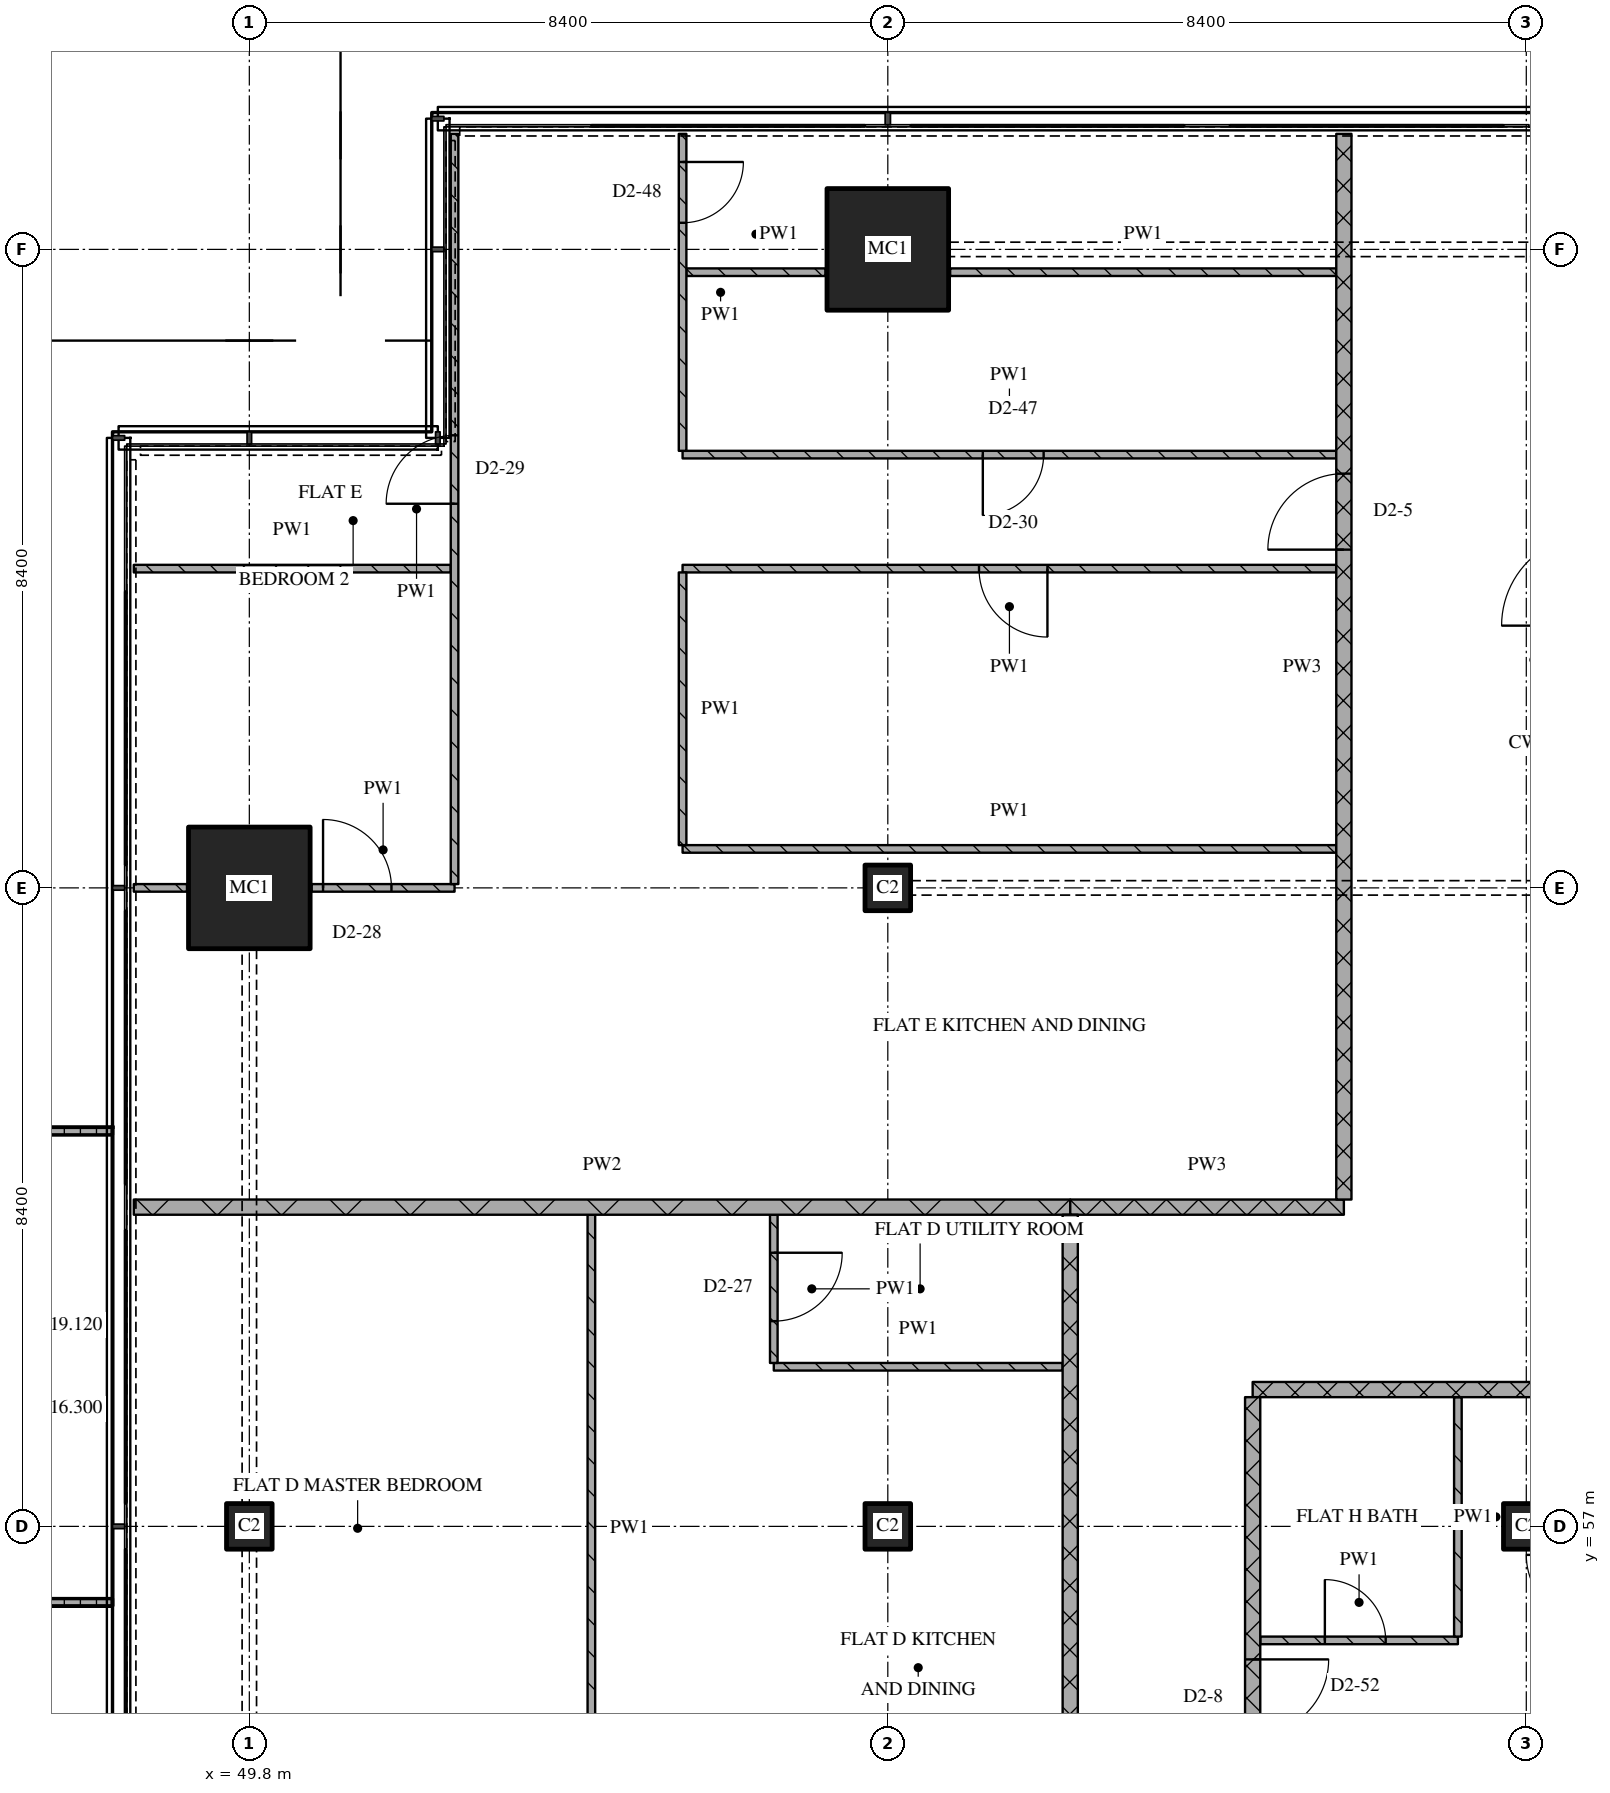
"""IFC4 building model, lengths in metres.
Left out: names, types, materials, properties, quantities, classifications, styles, units other than length and angle.
Written with IfcOpenShell. Run it as: python <this file> out.ifc"""

import sys

from ifc_helpers import new_model, si_unit, direction, frame, frame_2d, origin, origin_2d, place, context, subcontext, project, spatial, polyline, rectangle, outline, extrude, element, fill, save


model = new_model("IFC4")
c1 = context("Model", 3, precision=1e-05, world=origin(), true_north=direction((0.0, 1.0)))
c2 = subcontext(c1, "Body", "Model", "MODEL_VIEW")
j1 = project(units=[si_unit("LENGTHUNIT", "METRE"), si_unit("PLANEANGLEUNIT", "RADIAN")], contexts=[c1])
p1 = place(None, origin())
s1 = spatial("IfcSite", under=j1, at=p1, CompositionType="ELEMENT")
p2 = place(p1, origin())
s2 = spatial("IfcBuilding", under=s1, at=p2, CompositionType="ELEMENT")
p3 = place(p2, frame((0.0, 0.0, 216.3)))
s3 = spatial("IfcBuildingStorey", under=s2, at=p3, CompositionType="ELEMENT", Elevation=216.3)
p4 = place(p3, frame((49.8, 57.0, 0.0), z_axis=(0.0, 0.0, 1.0), x_axis=(1.0, 0.0, 0.0)))
e1 = element("IfcColumn", 1, at=p4, inside=s3, PredefinedType="COLUMN", context=c2, shape_type="SweptSolid", body=[
    extrude(rectangle(XDim=0.6, YDim=0.6, at=origin_2d()), origin(), (0.0, 0.0, 1.0), 3.6),
])
p5 = place(p3, frame((49.8, 65.4, 0.0), z_axis=(0.0, 0.0, 1.0), x_axis=(1.0, 0.0, 0.0)))
e2 = element("IfcColumn", 2, at=p5, inside=s3, PredefinedType="COLUMN", context=c2, shape_type="SweptSolid", body=[
    extrude(rectangle(XDim=1.6, YDim=1.6, at=origin_2d()), origin(), (0.0, 0.0, 1.0), 3.6),
])
for number, where, z_axis, x_axis in (
    (3, (58.2, 57.0, 0.0), (0.0, 0.0, 1.0), (1.0, 0.0, 0.0)),
    (4, (58.2, 65.4, 0.0), (0.0, 0.0, 1.0), (1.0, 0.0, 0.0)),
):
    element("IfcColumn", number, at=place(p3, frame(where, z_axis=z_axis, x_axis=x_axis)), inside=s3, PredefinedType="COLUMN", context=c2, shape_type="SweptSolid", body=[
        extrude(rectangle(XDim=0.6, YDim=0.6, at=origin_2d()), origin(), (0.0, 0.0, 1.0), 3.6),
    ])
p6 = place(p3, frame((58.2, 73.8, 0.0), z_axis=(0.0, 0.0, 1.0), x_axis=(1.0, 0.0, 0.0)))
e5 = element("IfcColumn", 5, at=p6, inside=s3, PredefinedType="COLUMN", context=c2, shape_type="SweptSolid", body=[
    extrude(rectangle(XDim=1.6, YDim=1.6, at=origin_2d()), origin(), (0.0, 0.0, 1.0), 3.6),
])
p7 = place(p3, frame((66.6, 57.0, 0.0), z_axis=(0.0, 0.0, 1.0), x_axis=(1.0, 0.0, 0.0)))
e6 = element("IfcColumn", 6, at=p7, inside=s3, PredefinedType="COLUMN", context=c2, shape_type="SweptSolid", body=[
    extrude(rectangle(XDim=0.6, YDim=0.6, at=origin_2d()), origin(), (0.0, 0.0, 1.0), 3.6),
])
p8 = place(p3, origin())
e7 = element("IfcWall", 7, at=p8, inside=s3, PredefinedType="SOLIDWALL", context=c2, shape_type="SweptSolid", body=[
    extrude(outline(polyline([(48.0, 62.25), (48.0, 62.15), (46.233, 62.15), (46.233, 56.05), (48.0, 56.05), (48.0, 55.95), (46.133, 55.95), (46.133, 62.25), (48.0, 62.25)])), origin(), (0.0, 0.0, 1.0), 1.0),
])
p9 = place(p3, frame((63.1, 55.5, 0.0), z_axis=(0.0, 0.0, 1.0), x_axis=(1.0, 0.0, 0.0)))
e8 = element("IfcWall", 8, at=p9, inside=s3, PredefinedType="PARTITIONING", context=c2, shape_type="SweptSolid", body=[
    extrude(rectangle(XDim=2.6, YDim=0.1, at=frame_2d((1.3, 0.0))), origin(), (0.0, 0.0, 1.0), 3.32),
])
p10 = place(p9, frame((0.85, 0.0, 0.0)))
e9 = element("IfcOpeningElement", 9, at=p10, cuts=e8, PredefinedType="OPENING", context=c2, shape_type="SweptSolid", body=[
    extrude(rectangle(XDim=0.8, YDim=2.1, at=frame_2d((0.4, 1.05))), frame((0.0, 0.06, 0.0), z_axis=(0.0, -1.0, 0.0), x_axis=(1.0, 0.0, 0.0)), (0.0, 0.0, 1.0), 0.12),
])
p11 = place(p3, frame((63.0, 58.8, 0.0), z_axis=(0.0, 0.0, 1.0), x_axis=(1.0, 0.0, 0.0)))
e10 = element("IfcWall", 10, at=p11, inside=s3, PredefinedType="PARTITIONING", context=c2, shape_type="SweptSolid", body=[
    extrude(rectangle(XDim=10.8, YDim=0.2, at=frame_2d((5.4, 0.0))), origin(), (0.0, 0.0, 1.0), 3.32),
])
p12 = place(p3, frame((56.7, 59.1, 0.0), z_axis=(0.0, 0.0, 1.0), x_axis=(1.0, 0.0, 0.0)))
e11 = element("IfcWall", 11, at=p12, inside=s3, PredefinedType="PARTITIONING", context=c2, shape_type="SweptSolid", body=[
    extrude(rectangle(XDim=3.8, YDim=0.1, at=frame_2d((1.9, 0.0))), origin(), (0.0, 0.0, 1.0), 3.32),
])
p13 = place(p3, frame((60.6, 61.2, 0.0), z_axis=(0.0, 0.0, 1.0), x_axis=(1.0, 0.0, 0.0)))
e12 = element("IfcWall", 12, at=p13, inside=s3, PredefinedType="PARTITIONING", context=c2, shape_type="SweptSolid", body=[
    extrude(rectangle(XDim=3.6, YDim=0.2, at=frame_2d((1.8, 0.0))), origin(), (0.0, 0.0, 1.0), 3.32),
])
p14 = place(p3, frame((48.28, 61.2, 0.0), z_axis=(0.0, 0.0, 1.0), x_axis=(1.0, 0.0, 0.0)))
e13 = element("IfcWall", 13, at=p14, inside=s3, PredefinedType="PARTITIONING", context=c2, shape_type="SweptSolid", body=[
    extrude(rectangle(XDim=12.32, YDim=0.2, at=frame_2d((6.16, 0.0))), origin(), (0.0, 0.0, 1.0), 3.32),
])
p15 = place(p3, frame((48.28, 65.4, 0.0), z_axis=(0.0, 0.0, 1.0), x_axis=(1.0, 0.0, 0.0)))
e14 = element("IfcWall", 14, at=p15, inside=s3, PredefinedType="PARTITIONING", context=c2, shape_type="SweptSolid", body=[
    extrude(rectangle(XDim=0.7, YDim=0.1, at=frame_2d((0.35, 0.0))), origin(), (0.0, 0.0, 1.0), 3.32),
])
p16 = place(p3, frame((50.62, 65.4, 0.0), z_axis=(0.0, 0.0, 1.0), x_axis=(1.0, 0.0, 0.0)))
e15 = element("IfcWall", 15, at=p16, inside=s3, PredefinedType="PARTITIONING", context=c2, shape_type="SweptSolid", body=[
    extrude(rectangle(XDim=1.88, YDim=0.1, at=frame_2d((0.94, 0.0))), origin(), (0.0, 0.0, 1.0), 3.32),
])
p17 = place(p16, frame((0.15, 0.0, 0.0)))
e16 = element("IfcOpeningElement", 16, at=p17, cuts=e15, PredefinedType="OPENING", context=c2, shape_type="SweptSolid", body=[
    extrude(rectangle(XDim=0.9, YDim=2.1, at=frame_2d((0.45, 1.05))), frame((0.0, 0.06, 0.0), z_axis=(0.0, -1.0, 0.0), x_axis=(1.0, 0.0, 0.0)), (0.0, 0.0, 1.0), 0.12),
])
p18 = place(p3, frame((55.5, 65.913, 0.0), z_axis=(0.0, 0.0, 1.0), x_axis=(1.0, 0.0, 0.0)))
e17 = element("IfcWall", 17, at=p18, inside=s3, PredefinedType="PARTITIONING", context=c2, shape_type="SweptSolid", body=[
    extrude(rectangle(XDim=8.6, YDim=0.1, at=frame_2d((4.3, 0.0))), origin(), (0.0, 0.0, 1.0), 3.32),
])
p19 = place(p3, frame((48.28, 69.6, 0.0), z_axis=(0.0, 0.0, 1.0), x_axis=(1.0, 0.0, 0.0)))
e18 = element("IfcWall", 18, at=p19, inside=s3, PredefinedType="PARTITIONING", context=c2, shape_type="SweptSolid", body=[
    extrude(rectangle(XDim=4.17, YDim=0.1, at=frame_2d((2.085, 0.0))), origin(), (0.0, 0.0, 1.0), 3.32),
])
p20 = place(p3, frame((64.1, 69.6, 0.0), z_axis=(0.0, 0.0, 1.0), x_axis=(-1.0, 0.0, 0.0)))
e19 = element("IfcWall", 19, at=p20, inside=s3, PredefinedType="PARTITIONING", context=c2, shape_type="SweptSolid", body=[
    extrude(rectangle(XDim=8.6, YDim=0.1, at=frame_2d((4.3, 0.0))), origin(), (0.0, 0.0, 1.0), 3.32),
])
p21 = place(p20, frame((3.8, 0.0, 0.0)))
e20 = element("IfcOpeningElement", 20, at=p21, cuts=e19, PredefinedType="OPENING", context=c2, shape_type="SweptSolid", body=[
    extrude(rectangle(XDim=0.9, YDim=2.1, at=frame_2d((0.45, 1.05))), frame((0.0, 0.06, 0.0), z_axis=(0.0, -1.0, 0.0), x_axis=(1.0, 0.0, 0.0)), (0.0, 0.0, 1.0), 0.12),
])
p22 = place(p3, frame((55.5, 71.1, 0.0), z_axis=(0.0, 0.0, 1.0), x_axis=(1.0, 0.0, 0.0)))
e21 = element("IfcWall", 21, at=p22, inside=s3, PredefinedType="PARTITIONING", context=c2, shape_type="SweptSolid", body=[
    extrude(rectangle(XDim=8.6, YDim=0.1, at=frame_2d((4.3, 0.0))), origin(), (0.0, 0.0, 1.0), 3.32),
])
p23 = place(p22, frame((3.95, 0.0, 0.0)))
e22 = element("IfcOpeningElement", 22, at=p23, cuts=e21, PredefinedType="OPENING", context=c2, shape_type="SweptSolid", body=[
    extrude(rectangle(XDim=0.8, YDim=2.1, at=frame_2d((0.4, 1.05))), frame((0.0, 0.06, 0.0), z_axis=(0.0, -1.0, 0.0), x_axis=(1.0, 0.0, 0.0)), (0.0, 0.0, 1.0), 0.12),
])
p24 = place(p3, frame((55.55, 73.5, 0.0), z_axis=(0.0, 0.0, 1.0), x_axis=(1.0, 0.0, 0.0)))
e23 = element("IfcWall", 23, at=p24, inside=s3, PredefinedType="PARTITIONING", context=c2, shape_type="SweptSolid", body=[
    extrude(rectangle(XDim=1.83, YDim=0.1, at=frame_2d((0.915, 0.0))), origin(), (0.0, 0.0, 1.0), 3.32),
])
p25 = place(p3, frame((59.02, 73.5, 0.0), z_axis=(0.0, 0.0, 1.0), x_axis=(1.0, 0.0, 0.0)))
e24 = element("IfcWall", 24, at=p25, inside=s3, PredefinedType="PARTITIONING", context=c2, shape_type="SweptSolid", body=[
    extrude(rectangle(XDim=5.08, YDim=0.1, at=frame_2d((2.54, 0.0))), origin(), (0.0, 0.0, 1.0), 3.32),
])
p26 = place(p3, frame((52.5, 65.45, 0.0), z_axis=(0.0, 0.0, 1.0), x_axis=(0.0, 1.0, 0.0)))
e25 = element("IfcWall", 25, at=p26, inside=s3, PredefinedType="PARTITIONING", context=c2, shape_type="SweptSolid", body=[
    extrude(rectangle(XDim=9.87, YDim=0.1, at=frame_2d((4.935, 0.0))), origin(), (0.0, 0.0, 1.0), 3.32),
])
p27 = place(p26, frame((5.004, 0.0, 0.0)))
e26 = element("IfcOpeningElement", 26, at=p27, cuts=e25, PredefinedType="OPENING", context=c2, shape_type="SweptSolid", body=[
    extrude(rectangle(XDim=0.9, YDim=2.1, at=frame_2d((0.45, 1.05))), frame((0.0, 0.06, 0.0), z_axis=(0.0, -1.0, 0.0), x_axis=(1.0, 0.0, 0.0)), (0.0, 0.0, 1.0), 0.12),
])
p28 = place(p3, frame((54.3, 61.1, 0.0), z_axis=(0.0, 0.0, 1.0), x_axis=(0.0, -1.0, 0.0)))
e27 = element("IfcWall", 27, at=p28, inside=s3, PredefinedType="PARTITIONING", context=c2, shape_type="SweptSolid", body=[
    extrude(rectangle(XDim=8.25, YDim=0.1, at=frame_2d((4.125, 0.0))), origin(), (0.0, 0.0, 1.0), 3.32),
])
p29 = place(p3, frame((55.5, 69.55, 0.0), z_axis=(0.0, 0.0, 1.0), x_axis=(0.0, -1.0, 0.0)))
e28 = element("IfcWall", 28, at=p29, inside=s3, PredefinedType="PARTITIONING", context=c2, shape_type="SweptSolid", body=[
    extrude(rectangle(XDim=3.587, YDim=0.1, at=frame_2d((1.794, 0.0))), origin(), (0.0, 0.0, 1.0), 3.32),
])
p30 = place(p3, frame((55.5, 75.32, 0.0), z_axis=(0.0, 0.0, 1.0), x_axis=(0.0, -1.0, 0.0)))
e29 = element("IfcWall", 29, at=p30, inside=s3, PredefinedType="PARTITIONING", context=c2, shape_type="SweptSolid", body=[
    extrude(rectangle(XDim=4.17, YDim=0.1, at=frame_2d((2.085, 0.0))), origin(), (0.0, 0.0, 1.0), 3.32),
])
p31 = place(p30, frame((0.37, 0.0, 0.0)))
e30 = element("IfcOpeningElement", 30, at=p31, cuts=e29, PredefinedType="OPENING", context=c2, shape_type="SweptSolid", body=[
    extrude(rectangle(XDim=0.8, YDim=2.1, at=frame_2d((0.4, 1.05))), frame((0.0, 0.06, 0.0), z_axis=(0.0, -1.0, 0.0), x_axis=(1.0, 0.0, 0.0)), (0.0, 0.0, 1.0), 0.12),
])
p32 = place(p3, frame((56.7, 61.1, 0.0), z_axis=(0.0, 0.0, 1.0), x_axis=(0.0, -1.0, 0.0)))
e31 = element("IfcWall", 31, at=p32, inside=s3, PredefinedType="PARTITIONING", context=c2, shape_type="SweptSolid", body=[
    extrude(rectangle(XDim=1.95, YDim=0.1, at=frame_2d((0.975, 0.0))), origin(), (0.0, 0.0, 1.0), 3.32),
])
p33 = place(p32, frame((0.5, 0.0, 0.0)))
e32 = element("IfcOpeningElement", 32, at=p33, cuts=e31, PredefinedType="OPENING", context=c2, shape_type="SweptSolid", body=[
    extrude(rectangle(XDim=0.9, YDim=2.1, at=frame_2d((0.45, 1.05))), frame((0.0, 0.06, 0.0), z_axis=(0.0, -1.0, 0.0), x_axis=(1.0, 0.0, 0.0)), (0.0, 0.0, 1.0), 0.12),
])
p34 = place(p3, frame((60.6, 43.3, 0.0), z_axis=(0.0, 0.0, 1.0), x_axis=(0.0, 1.0, 0.0)))
e33 = element("IfcWall", 33, at=p34, inside=s3, PredefinedType="PARTITIONING", context=c2, shape_type="SweptSolid", body=[
    extrude(rectangle(XDim=17.8, YDim=0.2, at=frame_2d((8.9, 0.0))), origin(), (0.0, 0.0, 1.0), 3.32),
])
p35 = place(p34, frame((7.05, 0.0, 0.0)))
e34 = element("IfcOpeningElement", 34, at=p35, cuts=e33, PredefinedType="OPENING", context=c2, shape_type="SweptSolid", body=[
    extrude(rectangle(XDim=1.0, YDim=2.1, at=frame_2d((0.5, 1.05))), frame((0.0, 0.11, 0.0), z_axis=(0.0, -1.0, 0.0), x_axis=(1.0, 0.0, 0.0)), (0.0, 0.0, 1.0), 0.22),
])
p36 = place(p3, frame((63.0, 58.7, 0.0), z_axis=(0.0, 0.0, 1.0), x_axis=(0.0, -1.0, 0.0)))
e35 = element("IfcWall", 35, at=p36, inside=s3, PredefinedType="PARTITIONING", context=c2, shape_type="SweptSolid", body=[
    extrude(rectangle(XDim=15.4, YDim=0.2, at=frame_2d((7.7, 0.0))), origin(), (0.0, 0.0, 1.0), 3.32),
])
p37 = place(p36, frame((3.45, 0.0, 0.0)))
e36 = element("IfcOpeningElement", 36, at=p37, cuts=e35, PredefinedType="OPENING", context=c2, shape_type="SweptSolid", body=[
    extrude(rectangle(XDim=1.0, YDim=2.1, at=frame_2d((0.5, 1.05))), frame((0.0, 0.11, 0.0), z_axis=(0.0, -1.0, 0.0), x_axis=(1.0, 0.0, 0.0)), (0.0, 0.0, 1.0), 0.22),
])
p38 = place(p36, frame((11.25, 0.0, 0.0)))
e37 = element("IfcOpeningElement", 37, at=p38, cuts=e35, PredefinedType="OPENING", context=c2, shape_type="SweptSolid", body=[
    extrude(rectangle(XDim=0.9, YDim=2.1, at=frame_2d((0.45, 1.05))), frame((0.0, 0.11, 0.0), z_axis=(0.0, -1.0, 0.0), x_axis=(1.0, 0.0, 0.0)), (0.0, 0.0, 1.0), 0.22),
])
p39 = place(p3, frame((64.2, 61.3, 0.0), z_axis=(0.0, 0.0, 1.0), x_axis=(0.0, 1.0, 0.0)))
e38 = element("IfcWall", 38, at=p39, inside=s3, PredefinedType="PARTITIONING", context=c2, shape_type="SweptSolid", body=[
    extrude(rectangle(XDim=14.02, YDim=0.2, at=frame_2d((7.01, 0.0))), origin(), (0.0, 0.0, 1.0), 3.32),
])
p40 = place(p39, frame((8.55, 0.0, 0.0)))
e39 = element("IfcOpeningElement", 39, at=p40, cuts=e38, PredefinedType="OPENING", context=c2, shape_type="SweptSolid", body=[
    extrude(rectangle(XDim=1.0, YDim=2.1, at=frame_2d((0.5, 1.05))), frame((0.0, 0.11, 0.0), z_axis=(0.0, -1.0, 0.0), x_axis=(1.0, 0.0, 0.0)), (0.0, 0.0, 1.0), 0.22),
])
p41 = place(p3, frame((65.7, 58.7, 0.0), z_axis=(0.0, 0.0, 1.0), x_axis=(0.0, -1.0, 0.0)))
e40 = element("IfcWall", 40, at=p41, inside=s3, PredefinedType="PARTITIONING", context=c2, shape_type="SweptSolid", body=[
    extrude(rectangle(XDim=3.15, YDim=0.1, at=frame_2d((1.575, 0.0))), origin(), (0.0, 0.0, 1.0), 3.32),
])
p42 = place(p10, origin())
e41 = element("IfcDoor", 41, at=p42, inside=s3, OperationType="SINGLE_SWING_LEFT", PredefinedType="DOOR", context=c2, shape_type="SweptSolid", body=[
    extrude(rectangle(XDim=0.8, YDim=2.1, at=frame_2d((0.4, 1.05))), frame((0.0, 0.025, 0.0), z_axis=(0.0, -1.0, 0.0), x_axis=(1.0, 0.0, 0.0)), (0.0, 0.0, 1.0), 0.05),
])
fill(e9, e41)
p43 = place(p17, origin())
e42 = element("IfcDoor", 42, at=p43, inside=s3, OperationType="SINGLE_SWING_LEFT", PredefinedType="DOOR", context=c2, shape_type="SweptSolid", body=[
    extrude(rectangle(XDim=0.9, YDim=2.1, at=frame_2d((0.45, 1.05))), frame((0.0, 0.025, 0.0), z_axis=(0.0, -1.0, 0.0), x_axis=(1.0, 0.0, 0.0)), (0.0, 0.0, 1.0), 0.05),
])
fill(e16, e42)
p44 = place(p21, origin())
e43 = element("IfcDoor", 43, at=p44, inside=s3, OperationType="SINGLE_SWING_LEFT", PredefinedType="DOOR", context=c2, shape_type="SweptSolid", body=[
    extrude(rectangle(XDim=0.9, YDim=2.1, at=frame_2d((0.45, 1.05))), frame((0.0, 0.025, 0.0), z_axis=(0.0, -1.0, 0.0), x_axis=(1.0, 0.0, 0.0)), (0.0, 0.0, 1.0), 0.05),
])
fill(e20, e43)
p45 = place(p23, origin())
e44 = element("IfcDoor", 44, at=p45, inside=s3, OperationType="SINGLE_SWING_RIGHT", PredefinedType="DOOR", context=c2, shape_type="SweptSolid", body=[
    extrude(rectangle(XDim=0.8, YDim=2.1, at=frame_2d((0.4, 1.05))), frame((0.0, 0.025, 0.0), z_axis=(0.0, -1.0, 0.0), x_axis=(1.0, 0.0, 0.0)), (0.0, 0.0, 1.0), 0.05),
])
fill(e22, e44)
p46 = place(p27, origin())
e45 = element("IfcDoor", 45, at=p46, inside=s3, OperationType="SINGLE_SWING_LEFT", PredefinedType="DOOR", context=c2, shape_type="SweptSolid", body=[
    extrude(rectangle(XDim=0.9, YDim=2.1, at=frame_2d((0.45, 1.05))), frame((0.0, 0.025, 0.0), z_axis=(0.0, -1.0, 0.0), x_axis=(1.0, 0.0, 0.0)), (0.0, 0.0, 1.0), 0.05),
])
fill(e26, e45)
p47 = place(p31, origin())
e46 = element("IfcDoor", 46, at=p47, inside=s3, OperationType="SINGLE_SWING_LEFT", PredefinedType="DOOR", context=c2, shape_type="SweptSolid", body=[
    extrude(rectangle(XDim=0.8, YDim=2.1, at=frame_2d((0.4, 1.05))), frame((0.0, 0.025, 0.0), z_axis=(0.0, -1.0, 0.0), x_axis=(1.0, 0.0, 0.0)), (0.0, 0.0, 1.0), 0.05),
])
fill(e30, e46)
p48 = place(p33, origin())
e47 = element("IfcDoor", 47, at=p48, inside=s3, OperationType="SINGLE_SWING_LEFT", PredefinedType="DOOR", context=c2, shape_type="SweptSolid", body=[
    extrude(rectangle(XDim=0.9, YDim=2.1, at=frame_2d((0.45, 1.05))), frame((0.0, 0.025, 0.0), z_axis=(0.0, -1.0, 0.0), x_axis=(1.0, 0.0, 0.0)), (0.0, 0.0, 1.0), 0.05),
])
fill(e32, e47)
p49 = place(p37, origin())
e48 = element("IfcDoor", 48, at=p49, inside=s3, OperationType="SINGLE_SWING_LEFT", PredefinedType="DOOR", context=c2, shape_type="SweptSolid", body=[
    extrude(rectangle(XDim=1.0, YDim=2.1, at=frame_2d((0.5, 1.05))), frame((0.0, 0.025, 0.0), z_axis=(0.0, -1.0, 0.0), x_axis=(1.0, 0.0, 0.0)), (0.0, 0.0, 1.0), 0.05),
])
fill(e36, e48)
p50 = place(p40, origin())
e49 = element("IfcDoor", 49, at=p50, inside=s3, OperationType="SINGLE_SWING_LEFT", PredefinedType="DOOR", context=c2, shape_type="SweptSolid", body=[
    extrude(rectangle(XDim=1.0, YDim=2.1, at=frame_2d((0.5, 1.05))), frame((0.0, 0.025, 0.0), z_axis=(0.0, -1.0, 0.0), x_axis=(1.0, 0.0, 0.0)), (0.0, 0.0, 1.0), 0.05),
])
fill(e39, e49)
save(model, sys.argv[1])
